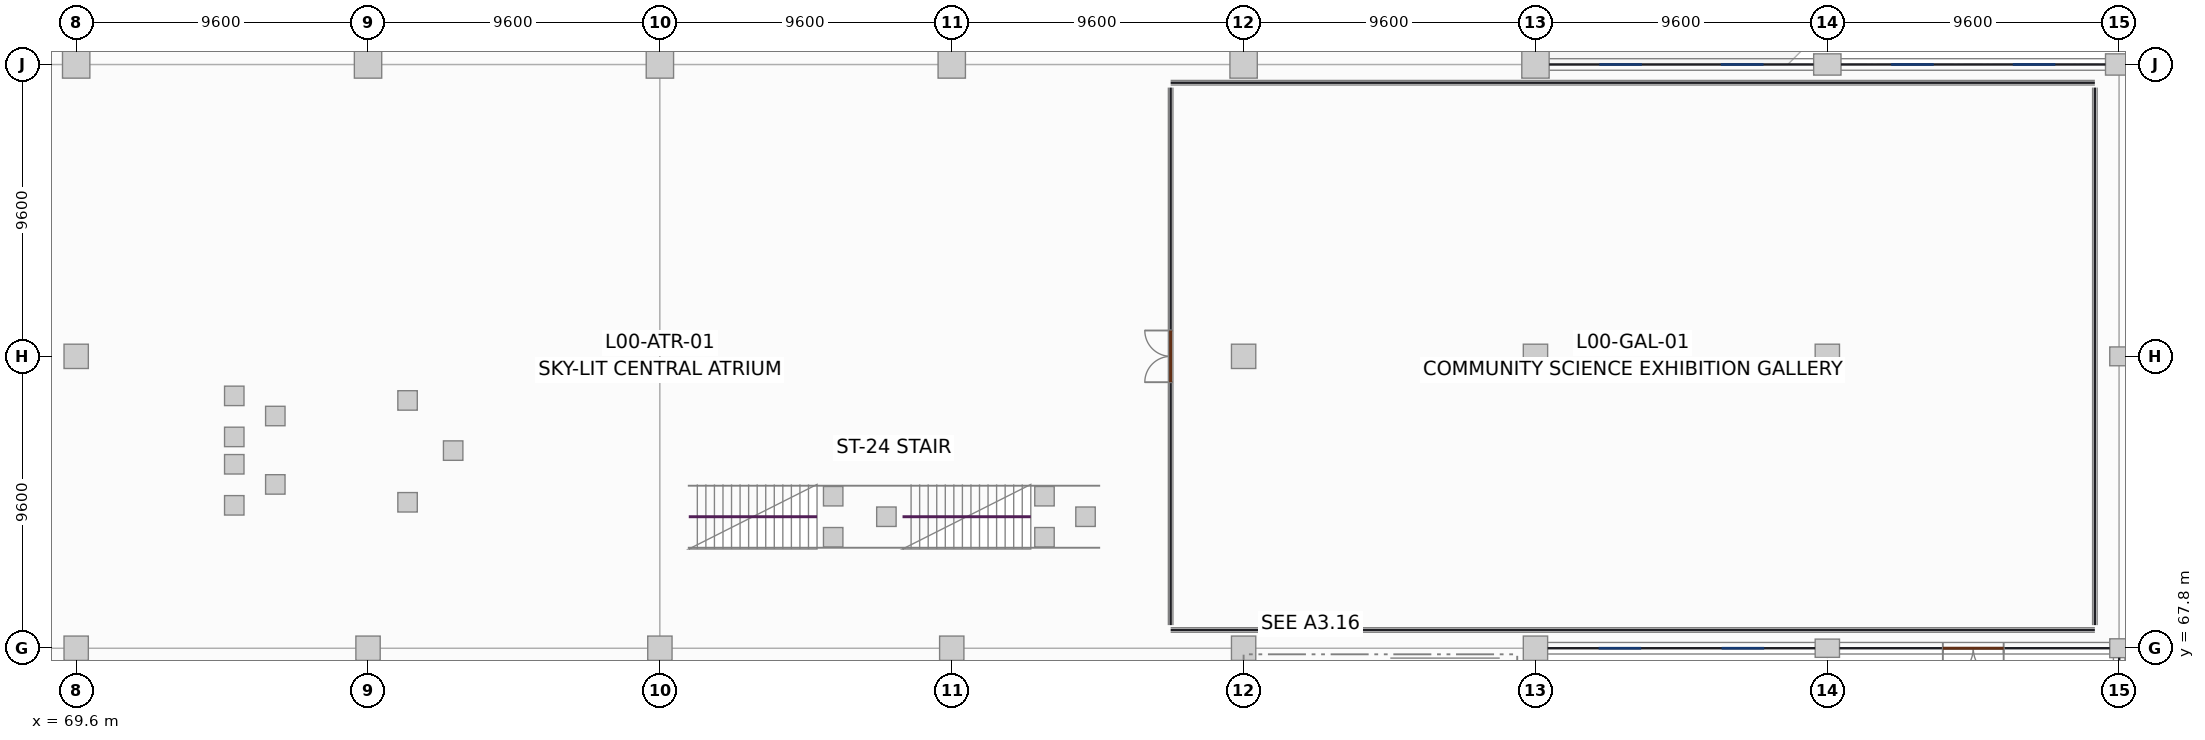
"""IFC4 building model, lengths in metres.
Left out: names, types, materials, properties, quantities, classifications, styles, units other than length and angle.
Written with IfcOpenShell. Run it as: python <this file> out.ifc"""

import sys

from ifc_helpers import new_model, si_unit, direction, frame, frame_2d, origin, origin_2d, place, context, subcontext, project, spatial, rectangle, circle, extrude, element, fill, save


model = new_model("IFC4")
c1 = context("Model", 3, precision=1e-05, world=origin(), true_north=direction((0.0, 1.0)))
c2 = subcontext(c1, "Body", "Model", "MODEL_VIEW")
j1 = project(units=[si_unit("LENGTHUNIT", "METRE"), si_unit("PLANEANGLEUNIT", "RADIAN")], contexts=[c1])
p1 = place(None, origin())
s1 = spatial("IfcSite", under=j1, at=p1, CompositionType="ELEMENT")
p2 = place(p1, origin())
s2 = spatial("IfcBuilding", under=s1, at=p2, CompositionType="ELEMENT")
p3 = place(p2, origin())
s3 = spatial("IfcBuildingStorey", under=s2, at=p3, CompositionType="ELEMENT", Elevation=0.0)
for number, where, z_axis, x_axis in (
    (1, (69.6, 67.8, 0.0), (0.0, 0.0, 1.0), (1.0, 0.0, 0.0)),
    (2, (69.6, 77.4, 0.0), (0.0, 0.0, 1.0), (1.0, 0.0, 0.0)),
):
    element("IfcColumn", number, at=place(p3, frame(where, z_axis=z_axis, x_axis=x_axis)), inside=s3, PredefinedType="COLUMN", context=c2, shape_type="SweptSolid", body=[
        extrude(rectangle(XDim=0.8, YDim=0.8, at=origin_2d()), origin(), (0.0, 0.0, 1.0), 5.08),
    ])
p4 = place(p3, frame((69.6, 87.0, 0.0), z_axis=(0.0, 0.0, 1.0), x_axis=(1.0, 0.0, 0.0)))
e3 = element("IfcColumn", 3, at=p4, inside=s3, PredefinedType="COLUMN", context=c2, shape_type="SweptSolid", body=[
    extrude(rectangle(XDim=0.9, YDim=0.9, at=origin_2d()), origin(), (0.0, 0.0, 1.0), 5.08),
])
p5 = place(p3, frame((79.2, 67.8, 0.0), z_axis=(0.0, 0.0, 1.0), x_axis=(1.0, 0.0, 0.0)))
e4 = element("IfcColumn", 4, at=p5, inside=s3, PredefinedType="COLUMN", context=c2, shape_type="SweptSolid", body=[
    extrude(rectangle(XDim=0.8, YDim=0.8, at=origin_2d()), origin(), (0.0, 0.0, 1.0), 5.08),
])
p6 = place(p3, frame((79.2, 87.0, 0.0), z_axis=(0.0, 0.0, 1.0), x_axis=(1.0, 0.0, 0.0)))
e5 = element("IfcColumn", 5, at=p6, inside=s3, PredefinedType="COLUMN", context=c2, shape_type="SweptSolid", body=[
    extrude(rectangle(XDim=0.9, YDim=0.9, at=origin_2d()), origin(), (0.0, 0.0, 1.0), 5.08),
])
p7 = place(p3, frame((88.8, 67.8, 0.0), z_axis=(0.0, 0.0, 1.0), x_axis=(1.0, 0.0, 0.0)))
e6 = element("IfcColumn", 6, at=p7, inside=s3, PredefinedType="COLUMN", context=c2, shape_type="SweptSolid", body=[
    extrude(rectangle(XDim=0.8, YDim=0.8, at=origin_2d()), origin(), (0.0, 0.0, 1.0), 5.08),
])
p8 = place(p3, frame((88.8, 87.0, 0.0), z_axis=(0.0, 0.0, 1.0), x_axis=(1.0, 0.0, 0.0)))
e7 = element("IfcColumn", 7, at=p8, inside=s3, PredefinedType="COLUMN", context=c2, shape_type="SweptSolid", body=[
    extrude(rectangle(XDim=0.9, YDim=0.9, at=origin_2d()), origin(), (0.0, 0.0, 1.0), 5.08),
])
p9 = place(p3, frame((98.4, 67.8, 0.0), z_axis=(0.0, 0.0, 1.0), x_axis=(1.0, 0.0, 0.0)))
e8 = element("IfcColumn", 8, at=p9, inside=s3, PredefinedType="COLUMN", context=c2, shape_type="SweptSolid", body=[
    extrude(rectangle(XDim=0.8, YDim=0.8, at=origin_2d()), origin(), (0.0, 0.0, 1.0), 5.08),
])
p10 = place(p3, frame((98.4, 87.0, 0.0), z_axis=(0.0, 0.0, 1.0), x_axis=(1.0, 0.0, 0.0)))
e9 = element("IfcColumn", 9, at=p10, inside=s3, PredefinedType="COLUMN", context=c2, shape_type="SweptSolid", body=[
    extrude(rectangle(XDim=0.9, YDim=0.9, at=origin_2d()), origin(), (0.0, 0.0, 1.0), 5.08),
])
for number, where, z_axis, x_axis in (
    (10, (108.0, 67.8, 0.0), (0.0, 0.0, 1.0), (1.0, 0.0, 0.0)),
    (11, (108.0, 77.4, 0.0), (0.0, 0.0, 1.0), (1.0, 0.0, 0.0)),
):
    element("IfcColumn", number, at=place(p3, frame(where, z_axis=z_axis, x_axis=x_axis)), inside=s3, PredefinedType="COLUMN", context=c2, shape_type="SweptSolid", body=[
        extrude(rectangle(XDim=0.8, YDim=0.8, at=origin_2d()), origin(), (0.0, 0.0, 1.0), 5.08),
    ])
p11 = place(p3, frame((108.0, 87.0, 0.0), z_axis=(0.0, 0.0, 1.0), x_axis=(1.0, 0.0, 0.0)))
e12 = element("IfcColumn", 12, at=p11, inside=s3, PredefinedType="COLUMN", context=c2, shape_type="SweptSolid", body=[
    extrude(rectangle(XDim=0.9, YDim=0.9, at=origin_2d()), origin(), (0.0, 0.0, 1.0), 5.08),
])
for number, where, z_axis, x_axis in (
    (13, (117.6, 67.8, 0.0), (0.0, 0.0, 1.0), (1.0, 0.0, 0.0)),
    (14, (117.6, 77.4, 0.0), (0.0, 0.0, 1.0), (1.0, 0.0, 0.0)),
):
    element("IfcColumn", number, at=place(p3, frame(where, z_axis=z_axis, x_axis=x_axis)), inside=s3, PredefinedType="COLUMN", context=c2, shape_type="SweptSolid", body=[
        extrude(rectangle(XDim=0.8, YDim=0.8, at=origin_2d()), origin(), (0.0, 0.0, 1.0), 5.08),
    ])
p12 = place(p3, frame((117.6, 87.0, 0.0), z_axis=(0.0, 0.0, 1.0), x_axis=(1.0, 0.0, 0.0)))
e15 = element("IfcColumn", 15, at=p12, inside=s3, PredefinedType="COLUMN", context=c2, shape_type="SweptSolid", body=[
    extrude(rectangle(XDim=0.9, YDim=0.9, at=origin_2d()), origin(), (0.0, 0.0, 1.0), 5.08),
])
p13 = place(p3, frame((127.2, 67.8, 0.0), z_axis=(0.0, 0.0, 1.0), x_axis=(1.0, 0.0, 0.0)))
e16 = element("IfcColumn", 16, at=p13, inside=s3, PredefinedType="COLUMN", context=c2, shape_type="SweptSolid", body=[
    extrude(rectangle(XDim=0.8, YDim=0.6, at=origin_2d()), origin(), (0.0, 0.0, 1.0), 5.08),
])
p14 = place(p3, frame((127.2, 77.4, 0.0), z_axis=(0.0, 0.0, 1.0), x_axis=(1.0, 0.0, 0.0)))
e17 = element("IfcColumn", 17, at=p14, inside=s3, PredefinedType="COLUMN", context=c2, shape_type="SweptSolid", body=[
    extrude(rectangle(XDim=0.8, YDim=0.8, at=origin_2d()), origin(), (0.0, 0.0, 1.0), 5.08),
])
p15 = place(p3, frame((127.2, 87.0, 0.0), z_axis=(0.0, 0.0, 1.0), x_axis=(1.0, 0.0, 0.0)))
e18 = element("IfcColumn", 18, at=p15, inside=s3, PredefinedType="COLUMN", context=c2, shape_type="SweptSolid", body=[
    extrude(rectangle(XDim=0.9, YDim=0.7, at=origin_2d()), origin(), (0.0, 0.0, 1.0), 5.08),
])
for number, where, z_axis, x_axis in (
    (19, (136.8, 67.8, 0.0), (0.0, 0.0, 1.0), (1.0, 0.0, 0.0)),
    (20, (136.8, 77.4, 0.0), (0.0, 0.0, 1.0), (1.0, 0.0, 0.0)),
):
    element("IfcColumn", number, at=place(p3, frame(where, z_axis=z_axis, x_axis=x_axis)), inside=s3, PredefinedType="COLUMN", context=c2, shape_type="SweptSolid", body=[
        extrude(rectangle(XDim=0.62, YDim=0.62, at=origin_2d()), origin(), (0.0, 0.0, 1.0), 5.08),
    ])
p16 = place(p3, frame((136.8, 87.0, 0.0), z_axis=(0.0, 0.0, 1.0), x_axis=(1.0, 0.0, 0.0)))
e21 = element("IfcColumn", 21, at=p16, inside=s3, PredefinedType="COLUMN", context=c2, shape_type="SweptSolid", body=[
    extrude(rectangle(XDim=0.9, YDim=0.7, at=origin_2d()), origin(), (0.0, 0.0, 1.0), 5.08),
])
p17 = place(p3, frame((118.052, 87.0, 0.0), z_axis=(0.0, 0.0, 1.0), x_axis=(1.0, 0.0, 0.0)))
e22 = element("IfcWall", 22, at=p17, inside=s3, PredefinedType="SOLIDWALL", context=c2, shape_type="SweptSolid", body=[
    extrude(rectangle(XDim=8.696, YDim=0.38, at=frame_2d((4.348, 0.0))), origin(), (0.0, 0.0, 1.0), 4.28),
])
p18 = place(p17, frame((1.648, 0.0, 0.85)))
e23 = element("IfcOpeningElement", 23, at=p18, cuts=e22, PredefinedType="OPENING", context=c2, shape_type="SweptSolid", body=[
    extrude(rectangle(XDim=1.4, YDim=1.65, at=frame_2d((0.7, 0.825))), frame((0.0, 0.2, 0.0), z_axis=(0.0, -1.0, 0.0), x_axis=(1.0, 0.0, 0.0)), (0.0, 0.0, 1.0), 0.4),
])
p19 = place(p17, frame((5.648, 0.0, 0.85)))
e24 = element("IfcOpeningElement", 24, at=p19, cuts=e22, PredefinedType="OPENING", context=c2, shape_type="SweptSolid", body=[
    extrude(rectangle(XDim=1.4, YDim=1.65, at=frame_2d((0.7, 0.825))), frame((0.0, 0.2, 0.0), z_axis=(0.0, -1.0, 0.0), x_axis=(1.0, 0.0, 0.0)), (0.0, 0.0, 1.0), 0.4),
])
p20 = place(p3, frame((127.652, 87.0, 0.0), z_axis=(0.0, 0.0, 1.0), x_axis=(1.0, 0.0, 0.0)))
e25 = element("IfcWall", 25, at=p20, inside=s3, PredefinedType="SOLIDWALL", context=c2, shape_type="SweptSolid", body=[
    extrude(rectangle(XDim=8.696, YDim=0.38, at=frame_2d((4.348, 0.0))), origin(), (0.0, 0.0, 1.0), 4.28),
])
p21 = place(p20, frame((1.648, 0.0, 0.85)))
e26 = element("IfcOpeningElement", 26, at=p21, cuts=e25, PredefinedType="OPENING", context=c2, shape_type="SweptSolid", body=[
    extrude(rectangle(XDim=1.4, YDim=1.65, at=frame_2d((0.7, 0.825))), frame((0.0, 0.2, 0.0), z_axis=(0.0, -1.0, 0.0), x_axis=(1.0, 0.0, 0.0)), (0.0, 0.0, 1.0), 0.4),
])
p22 = place(p20, frame((5.648, 0.0, 0.85)))
e27 = element("IfcOpeningElement", 27, at=p22, cuts=e25, PredefinedType="OPENING", context=c2, shape_type="SweptSolid", body=[
    extrude(rectangle(XDim=1.4, YDim=1.65, at=frame_2d((0.7, 0.825))), frame((0.0, 0.2, 0.0), z_axis=(0.0, -1.0, 0.0), x_axis=(1.0, 0.0, 0.0)), (0.0, 0.0, 1.0), 0.4),
])
p23 = place(p3, frame((136.8, 58.432, 0.0), z_axis=(0.0, 0.0, 1.0), x_axis=(0.0, 1.0, 0.0)))
e28 = element("IfcWall", 28, at=p23, inside=s3, PredefinedType="SOLIDWALL", context=c2, shape_type="SweptSolid", body=[
    extrude(rectangle(XDim=9.056, YDim=0.38, at=frame_2d((4.528, 0.0))), origin(), (0.0, 0.0, 1.0), 4.28),
])
p24 = place(p23, frame((1.745, 0.0, 0.85)))
e29 = element("IfcOpeningElement", 29, at=p24, cuts=e28, PredefinedType="OPENING", context=c2, shape_type="SweptSolid", body=[
    extrude(rectangle(XDim=1.4, YDim=1.65, at=frame_2d((0.7, 0.825))), frame((0.0, 0.2, 0.0), z_axis=(0.0, -1.0, 0.0), x_axis=(1.0, 0.0, 0.0)), (0.0, 0.0, 1.0), 0.4),
])
p25 = place(p23, frame((5.911, 0.0, 0.85)))
e30 = element("IfcOpeningElement", 30, at=p25, cuts=e28, PredefinedType="OPENING", context=c2, shape_type="SweptSolid", body=[
    extrude(rectangle(XDim=1.4, YDim=1.65, at=frame_2d((0.7, 0.825))), frame((0.0, 0.2, 0.0), z_axis=(0.0, -1.0, 0.0), x_axis=(1.0, 0.0, 0.0)), (0.0, 0.0, 1.0), 0.4),
])
p26 = place(p3, frame((118.002, 67.8, 0.0), z_axis=(0.0, 0.0, 1.0), x_axis=(1.0, 0.0, 0.0)))
e31 = element("IfcWall", 31, at=p26, inside=s3, PredefinedType="SOLIDWALL", context=c2, shape_type="SweptSolid", body=[
    extrude(rectangle(XDim=8.796, YDim=0.38, at=frame_2d((4.398, 0.0))), origin(), (0.0, 0.0, 1.0), 4.28),
])
p27 = place(p26, frame((1.675, 0.0, 0.85)))
e32 = element("IfcOpeningElement", 32, at=p27, cuts=e31, PredefinedType="OPENING", context=c2, shape_type="SweptSolid", body=[
    extrude(rectangle(XDim=1.4, YDim=1.65, at=frame_2d((0.7, 0.825))), frame((0.0, 0.2, 0.0), z_axis=(0.0, -1.0, 0.0), x_axis=(1.0, 0.0, 0.0)), (0.0, 0.0, 1.0), 0.4),
])
p28 = place(p26, frame((5.721, 0.0, 0.85)))
e33 = element("IfcOpeningElement", 33, at=p28, cuts=e31, PredefinedType="OPENING", context=c2, shape_type="SweptSolid", body=[
    extrude(rectangle(XDim=1.4, YDim=1.65, at=frame_2d((0.7, 0.825))), frame((0.0, 0.2, 0.0), z_axis=(0.0, -1.0, 0.0), x_axis=(1.0, 0.0, 0.0)), (0.0, 0.0, 1.0), 0.4),
])
p29 = place(p3, frame((127.602, 67.8, 0.0), z_axis=(0.0, 0.0, 1.0), x_axis=(1.0, 0.0, 0.0)))
e34 = element("IfcWall", 34, at=p29, inside=s3, PredefinedType="SOLIDWALL", context=c2, shape_type="SweptSolid", body=[
    extrude(rectangle(XDim=8.886, YDim=0.38, at=frame_2d((4.443, 0.0))), origin(), (0.0, 0.0, 1.0), 4.28),
])
p30 = place(p29, frame((3.398, 0.0, 0.0)))
e35 = element("IfcOpeningElement", 35, at=p30, cuts=e34, PredefinedType="OPENING", context=c2, shape_type="SweptSolid", body=[
    extrude(rectangle(XDim=2.0, YDim=2.6, at=frame_2d((1.0, 1.3))), frame((0.0, 0.2, 0.0), z_axis=(0.0, -1.0, 0.0), x_axis=(1.0, 0.0, 0.0)), (0.0, 0.0, 1.0), 0.4),
])
p31 = place(p3, frame((112.825, 67.3, 0.0), z_axis=(0.0, 0.0, 1.0), x_axis=(1.0, 0.0, 0.0)))
e36 = element("IfcWall", 36, at=p31, inside=s3, PredefinedType="SHEAR", context=c2, shape_type="SweptSolid", body=[
    extrude(rectangle(XDim=3.6, YDim=0.35, at=frame_2d((1.8, 0.0))), origin(), (0.0, 0.0, 1.0), 5.08),
])
for number, where, z_axis, x_axis in (
    (37, (94.5, 71.45, 0.0), (0.0, 0.0, 1.0), (1.0, 0.0, 0.0)),
    (38, (94.5, 72.8, 0.0), (0.0, 0.0, 1.0), (1.0, 0.0, 0.0)),
    (39, (96.25, 72.125, 0.0), (0.0, 0.0, 1.0), (1.0, 0.0, 0.0)),
):
    element("IfcColumn", number, at=place(p3, frame(where, z_axis=z_axis, x_axis=x_axis)), inside=s3, PredefinedType="COLUMN", context=c2, shape_type="SweptSolid", body=[
        extrude(circle(Radius=0.32, at=origin_2d()), origin(), (0.0, 0.0, 1.0), 2.5),
    ])
for number, where, z_axis, x_axis in (
    (40, (101.45, 71.45, 0.0), (0.0, 0.0, 1.0), (1.0, 0.0, 0.0)),
    (41, (101.45, 72.8, 0.0), (0.0, 0.0, 1.0), (1.0, 0.0, 0.0)),
    (42, (102.8, 72.125, 0.0), (0.0, 0.0, 1.0), (1.0, 0.0, 0.0)),
    (43, (74.8, 74.75, 0.0), (0.0, 0.0, 1.0), (1.0, 0.0, 0.0)),
    (44, (74.8, 76.1, 0.0), (0.0, 0.0, 1.0), (1.0, 0.0, 0.0)),
    (45, (76.15, 75.438, 0.0), (0.0, 0.0, 1.0), (1.0, 0.0, 0.0)),
):
    element("IfcColumn", number, at=place(p3, frame(where, z_axis=z_axis, x_axis=x_axis)), inside=s3, PredefinedType="COLUMN", context=c2, shape_type="SweptSolid", body=[
        extrude(circle(Radius=0.32, at=origin_2d()), origin(), (0.0, 0.0, 1.0), 5.2),
    ])
for number, where, z_axis, x_axis in (
    (46, (80.5, 72.6, 0.0), (0.0, 0.0, 1.0), (1.0, 0.0, 0.0)),
    (47, (80.5, 75.95, 0.0), (0.0, 0.0, 1.0), (1.0, 0.0, 0.0)),
    (48, (82.0, 74.3, 0.0), (0.0, 0.0, 1.0), (1.0, 0.0, 0.0)),
):
    element("IfcColumn", number, at=place(p3, frame(where, z_axis=z_axis, x_axis=x_axis)), inside=s3, PredefinedType="COLUMN", context=c2, shape_type="SweptSolid", body=[
        extrude(circle(Radius=0.32, at=origin_2d()), origin(), (0.0, 0.0, 1.0), 7.45),
    ])
for number, where, z_axis, x_axis in (
    (49, (74.8, 72.5, 0.0), (0.0, 0.0, 1.0), (1.0, 0.0, 0.0)),
    (50, (74.8, 73.85, 0.0), (0.0, 0.0, 1.0), (1.0, 0.0, 0.0)),
    (51, (76.15, 73.188, 0.0), (0.0, 0.0, 1.0), (1.0, 0.0, 0.0)),
):
    element("IfcColumn", number, at=place(p3, frame(where, z_axis=z_axis, x_axis=x_axis)), inside=s3, PredefinedType="COLUMN", context=c2, shape_type="SweptSolid", body=[
        extrude(circle(Radius=0.32, at=origin_2d()), origin(), (0.0, 0.0, 1.0), 9.7),
    ])
for number, where, z_axis, x_axis in (
    (52, (105.6, 68.4, 0.0), (0.0, 0.0, 1.0), (1.0, 0.0, 0.0)),
    (53, (105.6, 86.4, 0.0), (0.0, 0.0, 1.0), (1.0, 0.0, 0.0)),
):
    element("IfcWall", number, at=place(p3, frame(where, z_axis=z_axis, x_axis=x_axis)), inside=s3, PredefinedType="PARTITIONING", context=c2, shape_type="SweptSolid", body=[
        extrude(rectangle(XDim=30.4, YDim=0.15, at=frame_2d((15.2, 0.0))), origin(), (0.0, 0.0, 1.0), 4.12),
    ])
p32 = place(p3, frame((105.6, 68.56, 0.0), z_axis=(0.0, 0.0, 1.0), x_axis=(0.0, 1.0, 0.0)))
e54 = element("IfcWall", 54, at=p32, inside=s3, PredefinedType="PARTITIONING", context=c2, shape_type="SweptSolid", body=[
    extrude(rectangle(XDim=17.68, YDim=0.15, at=frame_2d((8.84, 0.0))), origin(), (0.0, 0.0, 1.0), 4.12),
])
p33 = place(p32, frame((7.99, 0.0, 0.0)))
e55 = element("IfcOpeningElement", 55, at=p33, cuts=e54, PredefinedType="OPENING", context=c2, shape_type="SweptSolid", body=[
    extrude(rectangle(XDim=1.7, YDim=2.3, at=frame_2d((0.85, 1.15))), frame((0.0, 0.085, 0.0), z_axis=(0.0, -1.0, 0.0), x_axis=(1.0, 0.0, 0.0)), (0.0, 0.0, 1.0), 0.17),
])
p34 = place(p3, frame((136.0, 68.56, 0.0), z_axis=(0.0, 0.0, 1.0), x_axis=(0.0, 1.0, 0.0)))
e56 = element("IfcWall", 56, at=p34, inside=s3, PredefinedType="PARTITIONING", context=c2, shape_type="SweptSolid", body=[
    extrude(rectangle(XDim=17.68, YDim=0.15, at=frame_2d((8.84, 0.0))), origin(), (0.0, 0.0, 1.0), 4.12),
])
p35 = place(p18, origin())
e57 = element("IfcWindow", 57, at=p35, inside=s3, PartitioningType="SINGLE_PANEL", PredefinedType="WINDOW", context=c2, shape_type="SweptSolid", body=[
    extrude(rectangle(XDim=1.4, YDim=1.65, at=frame_2d((0.7, 0.825))), frame((0.0, 0.03, 0.0), z_axis=(0.0, -1.0, 0.0), x_axis=(1.0, 0.0, 0.0)), (0.0, 0.0, 1.0), 0.06),
])
fill(e23, e57)
p36 = place(p19, origin())
e58 = element("IfcWindow", 58, at=p36, inside=s3, PartitioningType="SINGLE_PANEL", PredefinedType="WINDOW", context=c2, shape_type="SweptSolid", body=[
    extrude(rectangle(XDim=1.4, YDim=1.65, at=frame_2d((0.7, 0.825))), frame((0.0, 0.03, 0.0), z_axis=(0.0, -1.0, 0.0), x_axis=(1.0, 0.0, 0.0)), (0.0, 0.0, 1.0), 0.06),
])
fill(e24, e58)
p37 = place(p21, origin())
e59 = element("IfcWindow", 59, at=p37, inside=s3, PartitioningType="SINGLE_PANEL", PredefinedType="WINDOW", context=c2, shape_type="SweptSolid", body=[
    extrude(rectangle(XDim=1.4, YDim=1.65, at=frame_2d((0.7, 0.825))), frame((0.0, 0.03, 0.0), z_axis=(0.0, -1.0, 0.0), x_axis=(1.0, 0.0, 0.0)), (0.0, 0.0, 1.0), 0.06),
])
fill(e26, e59)
p38 = place(p22, origin())
e60 = element("IfcWindow", 60, at=p38, inside=s3, PartitioningType="SINGLE_PANEL", PredefinedType="WINDOW", context=c2, shape_type="SweptSolid", body=[
    extrude(rectangle(XDim=1.4, YDim=1.65, at=frame_2d((0.7, 0.825))), frame((0.0, 0.03, 0.0), z_axis=(0.0, -1.0, 0.0), x_axis=(1.0, 0.0, 0.0)), (0.0, 0.0, 1.0), 0.06),
])
fill(e27, e60)
p39 = place(p27, origin())
e61 = element("IfcWindow", 61, at=p39, inside=s3, PartitioningType="SINGLE_PANEL", PredefinedType="WINDOW", context=c2, shape_type="SweptSolid", body=[
    extrude(rectangle(XDim=1.4, YDim=1.65, at=frame_2d((0.7, 0.825))), frame((0.0, 0.03, 0.0), z_axis=(0.0, -1.0, 0.0), x_axis=(1.0, 0.0, 0.0)), (0.0, 0.0, 1.0), 0.06),
])
fill(e32, e61)
p40 = place(p28, origin())
e62 = element("IfcWindow", 62, at=p40, inside=s3, PartitioningType="SINGLE_PANEL", PredefinedType="WINDOW", context=c2, shape_type="SweptSolid", body=[
    extrude(rectangle(XDim=1.4, YDim=1.65, at=frame_2d((0.7, 0.825))), frame((0.0, 0.03, 0.0), z_axis=(0.0, -1.0, 0.0), x_axis=(1.0, 0.0, 0.0)), (0.0, 0.0, 1.0), 0.06),
])
fill(e33, e62)
p41 = place(p30, frame((2.0, 0.0, 0.0), z_axis=(0.0, 0.0, 1.0), x_axis=(-1.0, 0.0, 0.0)))
e63 = element("IfcDoor", 63, at=p41, inside=s3, OperationType="DOUBLE_DOOR_SINGLE_SWING", PredefinedType="DOOR", context=c2, shape_type="SweptSolid", body=[
    extrude(rectangle(XDim=2.0, YDim=2.6, at=frame_2d((1.0, 1.3))), frame((0.0, 0.025, 0.0), z_axis=(0.0, -1.0, 0.0), x_axis=(1.0, 0.0, 0.0)), (0.0, 0.0, 1.0), 0.05),
])
fill(e35, e63)
p42 = place(p33, origin())
e64 = element("IfcDoor", 64, at=p42, inside=s3, OperationType="DOUBLE_DOOR_SINGLE_SWING", PredefinedType="DOOR", context=c2, shape_type="SweptSolid", body=[
    extrude(rectangle(XDim=1.7, YDim=2.3, at=frame_2d((0.85, 1.15))), frame((0.0, 0.025, 0.0), z_axis=(0.0, -1.0, 0.0), x_axis=(1.0, 0.0, 0.0)), (0.0, 0.0, 1.0), 0.05),
])
fill(e55, e64)
save(model, sys.argv[1])
